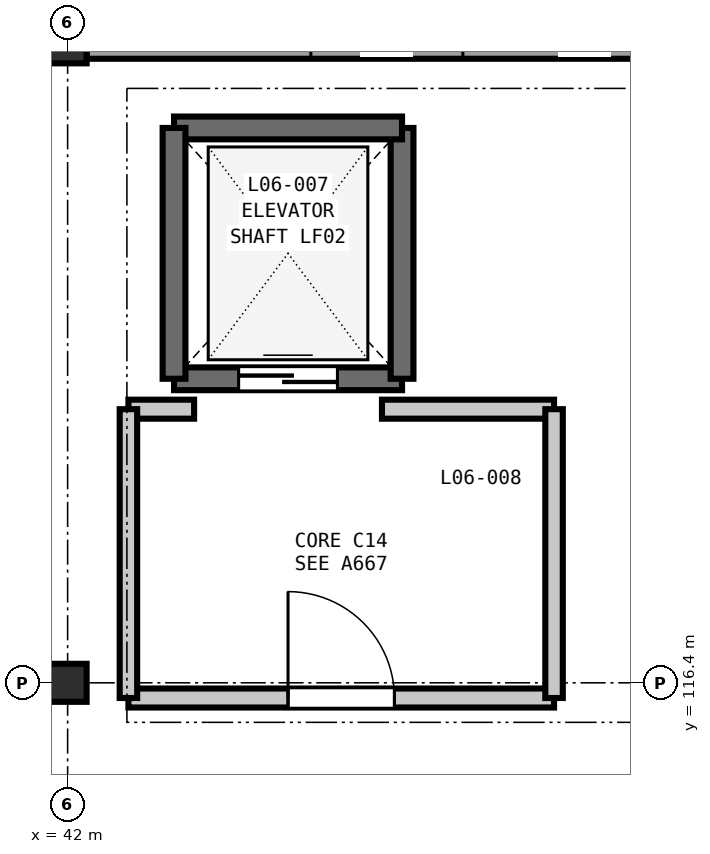
"""IFC4 building model, lengths in metres.
Left out: names, types, materials, properties, quantities, classifications, styles, units other than length and angle.
Written with IfcOpenShell. Run it as: python <this file> out.ifc"""

import sys

from ifc_helpers import new_model, si_unit, direction, frame, frame_2d, origin, origin_2d, place, context, subcontext, project, spatial, rectangle, extrude, element, fill, save


model = new_model("IFC4")
c1 = context("Model", 3, precision=1e-05, world=origin(), true_north=direction((0.0, 1.0)))
c2 = subcontext(c1, "Body", "Model", "MODEL_VIEW")
j1 = project(units=[si_unit("LENGTHUNIT", "METRE"), si_unit("PLANEANGLEUNIT", "RADIAN")], contexts=[c1])
p1 = place(None, origin())
s1 = spatial("IfcSite", under=j1, at=p1, CompositionType="ELEMENT")
p2 = place(p1, origin())
s2 = spatial("IfcBuilding", under=s1, at=p2, CompositionType="ELEMENT")
p3 = place(p2, frame((0.0, 0.0, 28.8)))
s3 = spatial("IfcBuildingStorey", under=s2, at=p3, CompositionType="ELEMENT", Elevation=28.8)
for number, where, z_axis, x_axis in (
    (1, (42.0, 116.4, 0.0), (0.0, 0.0, 1.0), (1.0, 0.0, 0.0)),
    (2, (42.0, 124.8, 0.0), (0.0, 0.0, 1.0), (1.0, 0.0, 0.0)),
):
    element("IfcColumn", number, at=place(p3, frame(where, z_axis=z_axis, x_axis=x_axis)), inside=s3, PredefinedType="COLUMN", context=c2, shape_type="SweptSolid", body=[
        extrude(rectangle(XDim=0.5, YDim=0.5, at=origin_2d()), origin(), (0.0, 0.0, 1.0), 4.2),
    ])
p4 = place(p3, frame((42.248, 124.8, 0.0), z_axis=(0.0, 0.0, 1.0), x_axis=(1.0, 0.0, 0.0)))
e3 = element("IfcWall", 3, at=p4, inside=s3, PredefinedType="SOLIDWALL", context=c2, shape_type="SweptSolid", body=[
    extrude(rectangle(XDim=7.904, YDim=0.38, at=frame_2d((3.952, 0.0))), origin(), (0.0, 0.0, 1.0), 3.48),
])
p5 = place(p4, frame((2.952, 0.0, 0.9)))
e4 = element("IfcOpeningElement", 4, at=p5, cuts=e3, PredefinedType="OPENING", context=c2, shape_type="SweptSolid", body=[
    extrude(rectangle(XDim=2.0, YDim=1.95, at=frame_2d((1.0, 0.975))), frame((0.0, 0.2, 0.0), z_axis=(0.0, -1.0, 0.0), x_axis=(1.0, 0.0, 0.0)), (0.0, 0.0, 1.0), 0.4),
])
p6 = place(p3, frame((43.4, 120.4, 0.0), z_axis=(0.0, 0.0, 1.0), x_axis=(1.0, 0.0, 0.0)))
e5 = element("IfcWall", 5, at=p6, inside=s3, PredefinedType="SHEAR", context=c2, shape_type="SweptSolid", body=[
    extrude(rectangle(XDim=3.0, YDim=0.3, at=frame_2d((1.5, 0.0))), origin(), (0.0, 0.0, 1.0), 4.2),
])
p7 = place(p6, frame((0.85, 0.0, 0.0)))
e6 = element("IfcOpeningElement", 6, at=p7, cuts=e5, PredefinedType="OPENING", context=c2, shape_type="SweptSolid", body=[
    extrude(rectangle(XDim=1.3, YDim=2.2, at=frame_2d((0.65, 1.1))), frame((0.0, 0.16, 0.0), z_axis=(0.0, -1.0, 0.0), x_axis=(1.0, 0.0, 0.0)), (0.0, 0.0, 1.0), 0.32),
])
p8 = place(p3, frame((46.4, 120.4, 0.0), z_axis=(0.0, 0.0, 1.0), x_axis=(0.0, 1.0, 0.0)))
e7 = element("IfcWall", 7, at=p8, inside=s3, PredefinedType="SHEAR", context=c2, shape_type="SweptSolid", body=[
    extrude(rectangle(XDim=3.3, YDim=0.3, at=frame_2d((1.65, 0.0))), origin(), (0.0, 0.0, 1.0), 4.2),
])
p9 = place(p3, frame((46.4, 123.7, 0.0), z_axis=(0.0, 0.0, 1.0), x_axis=(-1.0, 0.0, 0.0)))
e8 = element("IfcWall", 8, at=p9, inside=s3, PredefinedType="SHEAR", context=c2, shape_type="SweptSolid", body=[
    extrude(rectangle(XDim=3.0, YDim=0.3, at=frame_2d((1.5, 0.0))), origin(), (0.0, 0.0, 1.0), 4.2),
])
p10 = place(p3, frame((43.4, 123.7, 0.0), z_axis=(0.0, 0.0, 1.0), x_axis=(0.0, -1.0, 0.0)))
e9 = element("IfcWall", 9, at=p10, inside=s3, PredefinedType="SHEAR", context=c2, shape_type="SweptSolid", body=[
    extrude(rectangle(XDim=3.3, YDim=0.3, at=frame_2d((1.65, 0.0))), origin(), (0.0, 0.0, 1.0), 4.2),
])
p11 = place(p3, frame((42.8, 116.2, 0.0), z_axis=(0.0, 0.0, 1.0), x_axis=(1.0, 0.0, 0.0)))
e10 = element("IfcWall", 10, at=p11, inside=s3, PredefinedType="PARTITIONING", context=c2, shape_type="SweptSolid", body=[
    extrude(rectangle(XDim=5.6, YDim=0.25, at=frame_2d((2.8, 0.0))), origin(), (0.0, 0.0, 1.0), 3.635),
])
p12 = place(p11, frame((2.1, 0.0, 0.0)))
e11 = element("IfcOpeningElement", 11, at=p12, cuts=e10, PredefinedType="OPENING", context=c2, shape_type="SweptSolid", body=[
    extrude(rectangle(XDim=1.4, YDim=2.2, at=frame_2d((0.7, 1.1))), frame((0.0, 0.135, 0.0), z_axis=(0.0, -1.0, 0.0), x_axis=(1.0, 0.0, 0.0)), (0.0, 0.0, 1.0), 0.27),
])
p13 = place(p3, frame((46.136, 120.0, 0.0), z_axis=(0.0, 0.0, 1.0), x_axis=(1.0, 0.0, 0.0)))
e12 = element("IfcWall", 12, at=p13, inside=s3, PredefinedType="PARTITIONING", context=c2, shape_type="SweptSolid", body=[
    extrude(rectangle(XDim=2.264, YDim=0.25, at=frame_2d((1.132, 0.0))), origin(), (0.0, 0.0, 1.0), 3.92),
])
p14 = place(p3, frame((42.8, 120.0, 0.0), z_axis=(0.0, 0.0, 1.0), x_axis=(1.0, 0.0, 0.0)))
e13 = element("IfcWall", 13, at=p14, inside=s3, PredefinedType="PARTITIONING", context=c2, shape_type="SweptSolid", body=[
    extrude(rectangle(XDim=0.864, YDim=0.25, at=frame_2d((0.432, 0.0))), origin(), (0.0, 0.0, 1.0), 3.92),
])
for number, where, z_axis, x_axis in (
    (14, (42.8, 116.2, 0.0), (0.0, 0.0, 1.0), (0.0, 1.0, 0.0)),
    (15, (48.4, 116.2, 0.0), (0.0, 0.0, 1.0), (0.0, 1.0, 0.0)),
):
    element("IfcWall", number, at=place(p3, frame(where, z_axis=z_axis, x_axis=x_axis)), inside=s3, PredefinedType="PARTITIONING", context=c2, shape_type="SweptSolid", body=[
        extrude(rectangle(XDim=3.8, YDim=0.23, at=frame_2d((1.9, 0.0))), origin(), (0.0, 0.0, 1.0), 3.92),
    ])
p15 = place(p7, origin())
e16 = element("IfcDoor", 16, at=p15, inside=s3, OperationType="DOUBLE_DOOR_SLIDING", PredefinedType="DOOR", context=c2, shape_type="SweptSolid", body=[
    extrude(rectangle(XDim=1.3, YDim=2.2, at=frame_2d((0.65, 1.1))), frame((0.0, 0.025, 0.0), z_axis=(0.0, -1.0, 0.0), x_axis=(1.0, 0.0, 0.0)), (0.0, 0.0, 1.0), 0.05),
])
fill(e6, e16)
p16 = place(p12, origin())
e17 = element("IfcDoor", 17, at=p16, inside=s3, OperationType="SINGLE_SWING_LEFT", PredefinedType="DOOR", context=c2, shape_type="SweptSolid", body=[
    extrude(rectangle(XDim=1.4, YDim=2.2, at=frame_2d((0.7, 1.1))), frame((0.0, 0.025, 0.0), z_axis=(0.0, -1.0, 0.0), x_axis=(1.0, 0.0, 0.0)), (0.0, 0.0, 1.0), 0.05),
])
fill(e11, e17)
save(model, sys.argv[1])
